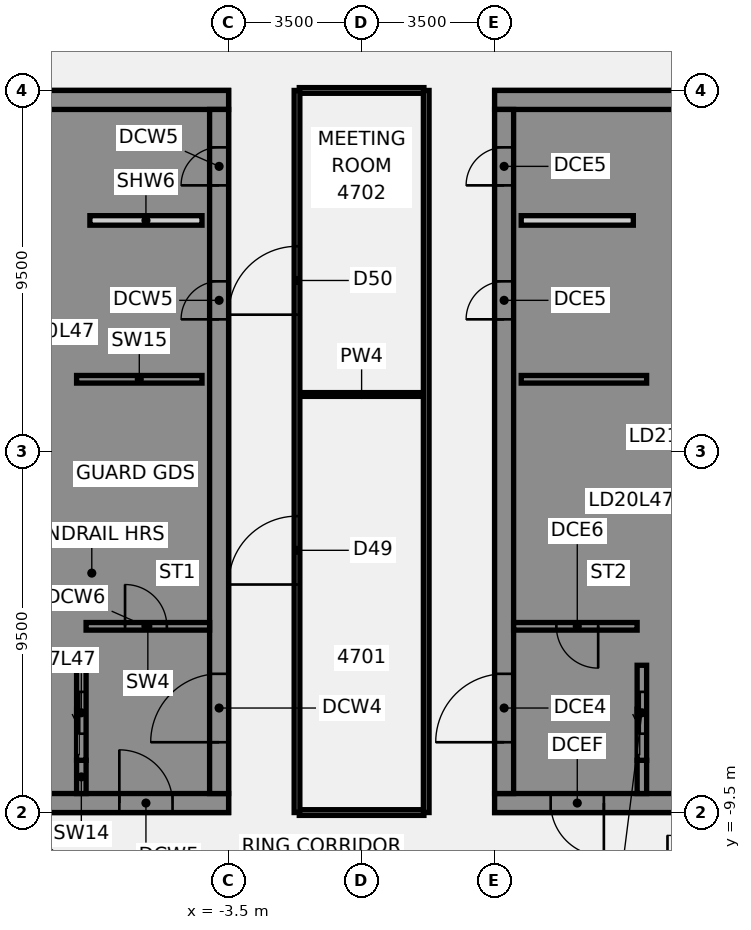
"""IFC4 building model, lengths in metres.
Left out: names, types, materials, properties, quantities, classifications, styles, units other than length and angle.
Written with IfcOpenShell. Run it as: python <this file> out.ifc"""

import sys

from ifc_helpers import new_model, si_unit, direction, frame, frame_2d, origin, place, context, subcontext, project, spatial, polyline, rectangle, outline, extrude, element, fill, save


model = new_model("IFC4")
c1 = context("Model", 3, precision=1e-05, world=origin(), true_north=direction((0.0, 1.0)))
c2 = subcontext(c1, "Body", "Model", "MODEL_VIEW")
j1 = project(units=[si_unit("LENGTHUNIT", "METRE"), si_unit("PLANEANGLEUNIT", "RADIAN")], contexts=[c1])
p1 = place(None, origin())
s1 = spatial("IfcSite", under=j1, at=p1, CompositionType="ELEMENT")
p2 = place(p1, origin())
s2 = spatial("IfcBuilding", under=s1, at=p2, CompositionType="ELEMENT")
p3 = place(p2, frame((0.0, 0.0, 189.7)))
s3 = spatial("IfcBuildingStorey", under=s2, at=p3, CompositionType="ELEMENT", Elevation=189.7)
p4 = place(p3, frame((-1.64, -9.5, 0.0), z_axis=(0.0, 0.0, 1.0), x_axis=(1.0, 0.0, 0.0)))
e1 = element("IfcWall", 1, at=p4, inside=s3, PredefinedType="PARTITIONING", context=c2, shape_type="SweptSolid", body=[
    extrude(rectangle(XDim=3.28, YDim=0.15, at=frame_2d((1.64, 0.0))), origin(), (0.0, 0.0, 1.0), 2.864),
])
p5 = place(p3, frame((-1.64, 1.5, 0.0), z_axis=(0.0, 0.0, 1.0), x_axis=(1.0, 0.0, 0.0)))
e2 = element("IfcWall", 2, at=p5, inside=s3, PredefinedType="PARTITIONING", context=c2, shape_type="SweptSolid", body=[
    extrude(rectangle(XDim=3.28, YDim=0.1, at=frame_2d((1.64, 0.0))), origin(), (0.0, 0.0, 1.0), 2.864),
])
p6 = place(p3, frame((-1.64, 9.5, 0.0), z_axis=(0.0, 0.0, 1.0), x_axis=(1.0, 0.0, 0.0)))
e3 = element("IfcWall", 3, at=p6, inside=s3, PredefinedType="PARTITIONING", context=c2, shape_type="SweptSolid", body=[
    extrude(rectangle(XDim=3.28, YDim=0.15, at=frame_2d((1.64, 0.0))), origin(), (0.0, 0.0, 1.0), 2.864),
])
p7 = place(p3, frame((-1.7, -9.5, 0.0), z_axis=(0.0, 0.0, 1.0), x_axis=(0.0, 1.0, 0.0)))
e4 = element("IfcWall", 4, at=p7, inside=s3, PredefinedType="PARTITIONING", context=c2, shape_type="SweptSolid", body=[
    extrude(rectangle(XDim=19.0, YDim=0.15, at=frame_2d((9.5, 0.0))), origin(), (0.0, 0.0, 1.0), 2.864),
])
p8 = place(p7, frame((6.0, 0.0, 0.0)))
e5 = element("IfcOpeningElement", 5, at=p8, cuts=e4, PredefinedType="OPENING", context=c2, shape_type="SweptSolid", body=[
    extrude(rectangle(XDim=1.8, YDim=2.1, at=frame_2d((0.9, 1.05))), frame((0.0, 0.085, 0.0), z_axis=(0.0, -1.0, 0.0), x_axis=(1.0, 0.0, 0.0)), (0.0, 0.0, 1.0), 0.17),
])
p9 = place(p7, frame((13.1, 0.0, 0.0)))
e6 = element("IfcOpeningElement", 6, at=p9, cuts=e4, PredefinedType="OPENING", context=c2, shape_type="SweptSolid", body=[
    extrude(rectangle(XDim=1.8, YDim=2.1, at=frame_2d((0.9, 1.05))), frame((0.0, 0.085, 0.0), z_axis=(0.0, -1.0, 0.0), x_axis=(1.0, 0.0, 0.0)), (0.0, 0.0, 1.0), 0.17),
])
p10 = place(p3, frame((1.7, -9.5, 0.0), z_axis=(0.0, 0.0, 1.0), x_axis=(0.0, 1.0, 0.0)))
e7 = element("IfcWall", 7, at=p10, inside=s3, PredefinedType="PARTITIONING", context=c2, shape_type="SweptSolid", body=[
    extrude(rectangle(XDim=19.0, YDim=0.15, at=frame_2d((9.5, 0.0))), origin(), (0.0, 0.0, 1.0), 2.864),
])
p11 = place(p3, frame((-16.5, -9.25, 0.0), z_axis=(0.0, 0.0, 1.0), x_axis=(1.0, 0.0, 0.0)))
e8 = element("IfcWall", 8, at=p11, inside=s3, PredefinedType="SHEAR", context=c2, shape_type="SweptSolid", body=[
    extrude(rectangle(XDim=13.0, YDim=0.5, at=frame_2d((6.5, 0.0))), origin(), (0.0, 0.0, 1.0), 3.46),
])
p12 = place(p11, frame((4.15, 0.0, 0.0)))
e9 = element("IfcOpeningElement", 9, at=p12, cuts=e8, PredefinedType="OPENING", context=c2, shape_type="SweptSolid", body=[
    extrude(rectangle(XDim=1.4, YDim=2.1, at=frame_2d((0.7, 1.05))), frame((0.0, 0.26, 0.0), z_axis=(0.0, -1.0, 0.0), x_axis=(1.0, 0.0, 0.0)), (0.0, 0.0, 1.0), 0.52),
])
p13 = place(p11, frame((10.125, 0.0, 0.0)))
e10 = element("IfcOpeningElement", 10, at=p13, cuts=e8, PredefinedType="OPENING", context=c2, shape_type="SweptSolid", body=[
    extrude(rectangle(XDim=1.4, YDim=2.1, at=frame_2d((0.7, 1.05))), frame((0.0, 0.26, 0.0), z_axis=(0.0, -1.0, 0.0), x_axis=(1.0, 0.0, 0.0)), (0.0, 0.0, 1.0), 0.52),
])
p14 = place(p3, frame((-16.5, 9.25, 0.0), z_axis=(0.0, 0.0, 1.0), x_axis=(1.0, 0.0, 0.0)))
e11 = element("IfcWall", 11, at=p14, inside=s3, PredefinedType="SHEAR", context=c2, shape_type="SweptSolid", body=[
    extrude(rectangle(XDim=13.0, YDim=0.5, at=frame_2d((6.5, 0.0))), origin(), (0.0, 0.0, 1.0), 3.46),
])
p15 = place(p3, origin())
e12 = element("IfcWall", 12, at=p15, inside=s3, PredefinedType="SHEAR", context=c2, shape_type="SweptSolid", body=[
    extrude(outline(polyline([(-9.8, -5.375), (-9.8, -5.625), (-7.5, -5.625), (-7.25, -5.625), (-7.25, 9.0), (-7.5, 9.0), (-9.8, 9.0), (-9.8, 8.125), (-7.5, 8.125), (-7.5, 5.625), (-9.8, 5.625), (-9.8, 5.375), (-7.5, 5.375), (-7.5, 2.875), (-9.8, 2.875), (-9.8, 2.625), (-7.5, 2.625), (-7.5, 0.125), (-9.8, 0.125), (-9.8, -0.125), (-7.5, -0.125), (-7.5, -2.625), (-9.8, -2.625), (-9.8, -2.875), (-7.5, -2.875), (-7.5, -5.375), (-9.8, -5.375)])), origin(), (0.0, 0.0, 1.0), 3.46),
])
p16 = place(p3, origin())
e13 = element("IfcWall", 13, at=p16, inside=s3, PredefinedType="SHEAR", context=c2, shape_type="SweptSolid", body=[
    extrude(outline(polyline([(-7.5, -8.125), (-9.55, -8.125), (-9.55, -5.625), (-9.8, -5.625), (-9.8, -8.125), (-9.8, -9.0), (-7.5, -9.0), (-7.5, -8.125)])), origin(), (0.0, 0.0, 1.0), 3.46),
])
p17 = place(p3, frame((-7.375, -9.0, 0.0), z_axis=(0.0, 0.0, 1.0), x_axis=(0.0, 1.0, 0.0)))
e14 = element("IfcWall", 14, at=p17, inside=s3, PredefinedType="SHEAR", context=c2, shape_type="SweptSolid", body=[
    extrude(rectangle(XDim=0.875, YDim=0.25, at=frame_2d((0.438, 0.0))), origin(), (0.0, 0.0, 1.0), 3.46),
])
p18 = place(p3, frame((-7.5, 1.9, 0.0), z_axis=(0.0, 0.0, 1.0), x_axis=(1.0, 0.0, 0.0)))
e15 = element("IfcWall", 15, at=p18, inside=s3, PredefinedType="SHEAR", context=c2, shape_type="SweptSolid", body=[
    extrude(rectangle(XDim=3.3, YDim=0.2, at=frame_2d((1.65, 0.0))), origin(), (0.0, 0.0, 1.0), 3.46),
])
p19 = place(p3, frame((-7.375, -8.125, 0.0), z_axis=(0.0, 0.0, 1.0), x_axis=(0.0, 1.0, 0.0)))
e16 = element("IfcWall", 16, at=p19, inside=s3, PredefinedType="SHEAR", context=c2, shape_type="SweptSolid", body=[
    extrude(rectangle(XDim=2.5, YDim=0.25, at=frame_2d((1.25, 0.0))), origin(), (0.0, 0.0, 1.0), 3.46),
])
p20 = place(p19, frame((0.7, 0.0, 0.0)))
e17 = element("IfcOpeningElement", 17, at=p20, cuts=e16, PredefinedType="OPENING", context=c2, shape_type="SweptSolid", body=[
    extrude(rectangle(XDim=1.1, YDim=2.1, at=frame_2d((0.55, 1.05))), frame((0.0, 0.135, 0.0), z_axis=(0.0, -1.0, 0.0), x_axis=(1.0, 0.0, 0.0)), (0.0, 0.0, 1.0), 0.27),
])
p21 = place(p3, frame((-3.75, -9.0, 0.0), z_axis=(0.0, 0.0, 1.0), x_axis=(0.0, 1.0, 0.0)))
e18 = element("IfcWall", 18, at=p21, inside=s3, PredefinedType="SHEAR", context=c2, shape_type="SweptSolid", body=[
    extrude(rectangle(XDim=18.0, YDim=0.5, at=frame_2d((9.0, 0.0))), origin(), (0.0, 0.0, 1.0), 3.46),
])
p22 = place(p21, frame((1.35, 0.0, 0.0)))
e19 = element("IfcOpeningElement", 19, at=p22, cuts=e18, PredefinedType="OPENING", context=c2, shape_type="SweptSolid", body=[
    extrude(rectangle(XDim=1.8, YDim=2.1, at=frame_2d((0.9, 1.05))), frame((0.0, 0.26, 0.0), z_axis=(0.0, -1.0, 0.0), x_axis=(1.0, 0.0, 0.0)), (0.0, 0.0, 1.0), 0.52),
])
p23 = place(p21, frame((12.478, 0.0, 0.0)))
e20 = element("IfcOpeningElement", 20, at=p23, cuts=e18, PredefinedType="OPENING", context=c2, shape_type="SweptSolid", body=[
    extrude(rectangle(XDim=1.0, YDim=2.1, at=frame_2d((0.5, 1.05))), frame((0.0, 0.26, 0.0), z_axis=(0.0, -1.0, 0.0), x_axis=(1.0, 0.0, 0.0)), (0.0, 0.0, 1.0), 0.52),
])
p24 = place(p21, frame((16.002, 0.0, 0.0)))
e21 = element("IfcOpeningElement", 21, at=p24, cuts=e18, PredefinedType="OPENING", context=c2, shape_type="SweptSolid", body=[
    extrude(rectangle(XDim=1.0, YDim=2.1, at=frame_2d((0.5, 1.05))), frame((0.0, 0.26, 0.0), z_axis=(0.0, -1.0, 0.0), x_axis=(1.0, 0.0, 0.0)), (0.0, 0.0, 1.0), 0.52),
])
p25 = place(p3, frame((-7.15, 6.08, 0.0), z_axis=(0.0, 0.0, 1.0), x_axis=(1.0, 0.0, 0.0)))
e22 = element("IfcWall", 22, at=p25, inside=s3, PredefinedType="PARTITIONING", context=c2, shape_type="SweptSolid", body=[
    extrude(rectangle(XDim=2.95, YDim=0.25, at=frame_2d((1.475, 0.0))), origin(), (0.0, 0.0, 1.0), 3.46),
])
p26 = place(p3, frame((-7.25, -4.6, 0.0), z_axis=(0.0, 0.0, 1.0), x_axis=(1.0, 0.0, 0.0)))
e23 = element("IfcWall", 23, at=p26, inside=s3, PredefinedType="SHEAR", context=c2, shape_type="SweptSolid", body=[
    extrude(rectangle(XDim=3.25, YDim=0.2, at=frame_2d((1.625, 0.0))), origin(), (0.0, 0.0, 1.0), 3.46),
])
p27 = place(p26, frame((1.025, 0.0, 0.0)))
e24 = element("IfcOpeningElement", 24, at=p27, cuts=e23, PredefinedType="OPENING", context=c2, shape_type="SweptSolid", body=[
    extrude(rectangle(XDim=1.1, YDim=2.1, at=frame_2d((0.55, 1.05))), frame((0.0, 0.11, 0.0), z_axis=(0.0, -1.0, 0.0), x_axis=(1.0, 0.0, 0.0)), (0.0, 0.0, 1.0), 0.22),
])
p28 = place(p3, frame((16.5, -9.25, 0.0), z_axis=(0.0, 0.0, 1.0), x_axis=(-1.0, 0.0, 0.0)))
e25 = element("IfcWall", 25, at=p28, inside=s3, PredefinedType="SHEAR", context=c2, shape_type="SweptSolid", body=[
    extrude(rectangle(XDim=13.0, YDim=0.5, at=frame_2d((6.5, 0.0))), origin(), (0.0, 0.0, 1.0), 3.46),
])
p29 = place(p28, frame((4.15, 0.0, 0.0)))
e26 = element("IfcOpeningElement", 26, at=p29, cuts=e25, PredefinedType="OPENING", context=c2, shape_type="SweptSolid", body=[
    extrude(rectangle(XDim=1.4, YDim=2.1, at=frame_2d((0.7, 1.05))), frame((0.0, 0.26, 0.0), z_axis=(0.0, -1.0, 0.0), x_axis=(1.0, 0.0, 0.0)), (0.0, 0.0, 1.0), 0.52),
])
p30 = place(p28, frame((10.125, 0.0, 0.0)))
e27 = element("IfcOpeningElement", 27, at=p30, cuts=e25, PredefinedType="OPENING", context=c2, shape_type="SweptSolid", body=[
    extrude(rectangle(XDim=1.4, YDim=2.1, at=frame_2d((0.7, 1.05))), frame((0.0, 0.26, 0.0), z_axis=(0.0, -1.0, 0.0), x_axis=(1.0, 0.0, 0.0)), (0.0, 0.0, 1.0), 0.52),
])
p31 = place(p3, frame((16.5, 9.25, 0.0), z_axis=(0.0, 0.0, 1.0), x_axis=(-1.0, 0.0, 0.0)))
e28 = element("IfcWall", 28, at=p31, inside=s3, PredefinedType="SHEAR", context=c2, shape_type="SweptSolid", body=[
    extrude(rectangle(XDim=13.0, YDim=0.5, at=frame_2d((6.5, 0.0))), origin(), (0.0, 0.0, 1.0), 3.46),
])
p32 = place(p3, origin())
e29 = element("IfcWall", 29, at=p32, inside=s3, PredefinedType="SHEAR", context=c2, shape_type="SweptSolid", body=[
    extrude(outline(polyline([(9.8, -5.375), (7.5, -5.375), (7.5, -2.875), (9.8, -2.875), (9.8, -2.625), (7.5, -2.625), (7.5, -0.125), (9.8, -0.125), (9.8, 0.125), (7.5, 0.125), (7.5, 2.625), (9.8, 2.625), (9.8, 2.875), (7.5, 2.875), (7.5, 5.375), (9.8, 5.375), (9.8, 5.625), (7.5, 5.625), (7.5, 8.125), (9.8, 8.125), (9.8, 9.0), (7.5, 9.0), (7.25, 9.0), (7.25, -5.625), (7.5, -5.625), (9.8, -5.625), (9.8, -5.375)])), origin(), (0.0, 0.0, 1.0), 3.46),
])
p33 = place(p3, origin())
e30 = element("IfcWall", 30, at=p33, inside=s3, PredefinedType="SHEAR", context=c2, shape_type="SweptSolid", body=[
    extrude(outline(polyline([(7.5, -8.125), (7.5, -9.0), (9.8, -9.0), (9.8, -8.125), (9.8, -5.625), (9.55, -5.625), (9.55, -8.125), (7.5, -8.125)])), origin(), (0.0, 0.0, 1.0), 3.46),
])
p34 = place(p3, frame((7.375, -9.0, 0.0), z_axis=(0.0, 0.0, 1.0), x_axis=(0.0, 1.0, 0.0)))
e31 = element("IfcWall", 31, at=p34, inside=s3, PredefinedType="SHEAR", context=c2, shape_type="SweptSolid", body=[
    extrude(rectangle(XDim=0.875, YDim=0.25, at=frame_2d((0.438, 0.0))), origin(), (0.0, 0.0, 1.0), 3.46),
])
p35 = place(p3, frame((7.5, 1.9, 0.0), z_axis=(0.0, 0.0, 1.0), x_axis=(-1.0, 0.0, 0.0)))
e32 = element("IfcWall", 32, at=p35, inside=s3, PredefinedType="SHEAR", context=c2, shape_type="SweptSolid", body=[
    extrude(rectangle(XDim=3.3, YDim=0.2, at=frame_2d((1.65, 0.0))), origin(), (0.0, 0.0, 1.0), 3.46),
])
p36 = place(p3, frame((7.375, -8.125, 0.0), z_axis=(0.0, 0.0, 1.0), x_axis=(0.0, 1.0, 0.0)))
e33 = element("IfcWall", 33, at=p36, inside=s3, PredefinedType="SHEAR", context=c2, shape_type="SweptSolid", body=[
    extrude(rectangle(XDim=2.5, YDim=0.25, at=frame_2d((1.25, 0.0))), origin(), (0.0, 0.0, 1.0), 3.46),
])
p37 = place(p36, frame((0.7, 0.0, 0.0)))
e34 = element("IfcOpeningElement", 34, at=p37, cuts=e33, PredefinedType="OPENING", context=c2, shape_type="SweptSolid", body=[
    extrude(rectangle(XDim=1.1, YDim=2.1, at=frame_2d((0.55, 1.05))), frame((0.0, 0.135, 0.0), z_axis=(0.0, -1.0, 0.0), x_axis=(1.0, 0.0, 0.0)), (0.0, 0.0, 1.0), 0.27),
])
p38 = place(p3, frame((3.75, -9.0, 0.0), z_axis=(0.0, 0.0, 1.0), x_axis=(0.0, 1.0, 0.0)))
e35 = element("IfcWall", 35, at=p38, inside=s3, PredefinedType="SHEAR", context=c2, shape_type="SweptSolid", body=[
    extrude(rectangle(XDim=18.0, YDim=0.5, at=frame_2d((9.0, 0.0))), origin(), (0.0, 0.0, 1.0), 3.46),
])
p39 = place(p38, frame((1.35, 0.0, 0.0)))
e36 = element("IfcOpeningElement", 36, at=p39, cuts=e35, PredefinedType="OPENING", context=c2, shape_type="SweptSolid", body=[
    extrude(rectangle(XDim=1.8, YDim=2.1, at=frame_2d((0.9, 1.05))), frame((0.0, 0.26, 0.0), z_axis=(0.0, -1.0, 0.0), x_axis=(1.0, 0.0, 0.0)), (0.0, 0.0, 1.0), 0.52),
])
p40 = place(p38, frame((12.478, 0.0, 0.0)))
e37 = element("IfcOpeningElement", 37, at=p40, cuts=e35, PredefinedType="OPENING", context=c2, shape_type="SweptSolid", body=[
    extrude(rectangle(XDim=1.0, YDim=2.1, at=frame_2d((0.5, 1.05))), frame((0.0, 0.26, 0.0), z_axis=(0.0, -1.0, 0.0), x_axis=(1.0, 0.0, 0.0)), (0.0, 0.0, 1.0), 0.52),
])
p41 = place(p38, frame((16.002, 0.0, 0.0)))
e38 = element("IfcOpeningElement", 38, at=p41, cuts=e35, PredefinedType="OPENING", context=c2, shape_type="SweptSolid", body=[
    extrude(rectangle(XDim=1.0, YDim=2.1, at=frame_2d((0.5, 1.05))), frame((0.0, 0.26, 0.0), z_axis=(0.0, -1.0, 0.0), x_axis=(1.0, 0.0, 0.0)), (0.0, 0.0, 1.0), 0.52),
])
p42 = place(p3, frame((7.15, 6.08, 0.0), z_axis=(0.0, 0.0, 1.0), x_axis=(-1.0, 0.0, 0.0)))
e39 = element("IfcWall", 39, at=p42, inside=s3, PredefinedType="PARTITIONING", context=c2, shape_type="SweptSolid", body=[
    extrude(rectangle(XDim=2.95, YDim=0.25, at=frame_2d((1.475, 0.0))), origin(), (0.0, 0.0, 1.0), 3.46),
])
p43 = place(p3, frame((7.25, -4.6, 0.0), z_axis=(0.0, 0.0, 1.0), x_axis=(-1.0, 0.0, 0.0)))
e40 = element("IfcWall", 40, at=p43, inside=s3, PredefinedType="SHEAR", context=c2, shape_type="SweptSolid", body=[
    extrude(rectangle(XDim=3.25, YDim=0.2, at=frame_2d((1.625, 0.0))), origin(), (0.0, 0.0, 1.0), 3.46),
])
p44 = place(p43, frame((1.025, 0.0, 0.0)))
e41 = element("IfcOpeningElement", 41, at=p44, cuts=e40, PredefinedType="OPENING", context=c2, shape_type="SweptSolid", body=[
    extrude(rectangle(XDim=1.1, YDim=2.1, at=frame_2d((0.55, 1.05))), frame((0.0, 0.11, 0.0), z_axis=(0.0, -1.0, 0.0), x_axis=(1.0, 0.0, 0.0)), (0.0, 0.0, 1.0), 0.22),
])
p45 = place(p8, frame((1.8, 0.0, 0.0), z_axis=(0.0, 0.0, 1.0), x_axis=(-1.0, 0.0, 0.0)))
e42 = element("IfcDoor", 42, at=p45, inside=s3, OperationType="DOUBLE_DOOR_SINGLE_SWING", PredefinedType="DOOR", context=c2, shape_type="SweptSolid", body=[
    extrude(rectangle(XDim=1.8, YDim=2.1, at=frame_2d((0.9, 1.05))), frame((0.0, 0.025, 0.0), z_axis=(0.0, -1.0, 0.0), x_axis=(1.0, 0.0, 0.0)), (0.0, 0.0, 1.0), 0.05),
])
fill(e5, e42)
p46 = place(p9, frame((1.8, 0.0, 0.0), z_axis=(0.0, 0.0, 1.0), x_axis=(-1.0, 0.0, 0.0)))
e43 = element("IfcDoor", 43, at=p46, inside=s3, OperationType="DOUBLE_DOOR_SINGLE_SWING", PredefinedType="DOOR", context=c2, shape_type="SweptSolid", body=[
    extrude(rectangle(XDim=1.8, YDim=2.1, at=frame_2d((0.9, 1.05))), frame((0.0, 0.025, 0.0), z_axis=(0.0, -1.0, 0.0), x_axis=(1.0, 0.0, 0.0)), (0.0, 0.0, 1.0), 0.05),
])
fill(e6, e43)
p47 = place(p13, origin())
e44 = element("IfcDoor", 44, at=p47, inside=s3, OperationType="SINGLE_SWING_LEFT", PredefinedType="DOOR", context=c2, shape_type="SweptSolid", body=[
    extrude(rectangle(XDim=1.4, YDim=2.1, at=frame_2d((0.7, 1.05))), frame((0.0, 0.025, 0.0), z_axis=(0.0, -1.0, 0.0), x_axis=(1.0, 0.0, 0.0)), (0.0, 0.0, 1.0), 0.05),
])
fill(e10, e44)
p48 = place(p22, origin())
e45 = element("IfcDoor", 45, at=p48, inside=s3, OperationType="SINGLE_SWING_LEFT", PredefinedType="DOOR", context=c2, shape_type="SweptSolid", body=[
    extrude(rectangle(XDim=1.8, YDim=2.1, at=frame_2d((0.9, 1.05))), frame((0.0, 0.025, 0.0), z_axis=(0.0, -1.0, 0.0), x_axis=(1.0, 0.0, 0.0)), (0.0, 0.0, 1.0), 0.05),
])
fill(e19, e45)
p49 = place(p23, origin())
e46 = element("IfcDoor", 46, at=p49, inside=s3, OperationType="SINGLE_SWING_LEFT", PredefinedType="DOOR", context=c2, shape_type="SweptSolid", body=[
    extrude(rectangle(XDim=1.0, YDim=2.1, at=frame_2d((0.5, 1.05))), frame((0.0, 0.225, 0.0), z_axis=(0.0, -1.0, 0.0), x_axis=(1.0, 0.0, 0.0)), (0.0, 0.0, 1.0), 0.05),
])
fill(e20, e46)
p50 = place(p24, origin())
e47 = element("IfcDoor", 47, at=p50, inside=s3, OperationType="SINGLE_SWING_LEFT", PredefinedType="DOOR", context=c2, shape_type="SweptSolid", body=[
    extrude(rectangle(XDim=1.0, YDim=2.1, at=frame_2d((0.5, 1.05))), frame((0.0, 0.225, 0.0), z_axis=(0.0, -1.0, 0.0), x_axis=(1.0, 0.0, 0.0)), (0.0, 0.0, 1.0), 0.05),
])
fill(e21, e47)
p51 = place(p27, origin())
e48 = element("IfcDoor", 48, at=p51, inside=s3, OperationType="SINGLE_SWING_LEFT", PredefinedType="DOOR", context=c2, shape_type="SweptSolid", body=[
    extrude(rectangle(XDim=1.1, YDim=2.1, at=frame_2d((0.55, 1.05))), frame((0.0, 0.025, 0.0), z_axis=(0.0, -1.0, 0.0), x_axis=(1.0, 0.0, 0.0)), (0.0, 0.0, 1.0), 0.05),
])
fill(e24, e48)
p52 = place(p20, origin())
e49 = element("IfcDoor", 49, at=p52, inside=s3, OperationType="SLIDING_TO_LEFT", PredefinedType="DOOR", context=c2, shape_type="SweptSolid", body=[
    extrude(rectangle(XDim=1.1, YDim=2.1, at=frame_2d((0.55, 1.05))), frame((0.0, 0.025, 0.0), z_axis=(0.0, -1.0, 0.0), x_axis=(1.0, 0.0, 0.0)), (0.0, 0.0, 1.0), 0.05),
])
fill(e17, e49)
p53 = place(p30, origin())
e50 = element("IfcDoor", 50, at=p53, inside=s3, OperationType="SINGLE_SWING_LEFT", PredefinedType="DOOR", context=c2, shape_type="SweptSolid", body=[
    extrude(rectangle(XDim=1.4, YDim=2.1, at=frame_2d((0.7, 1.05))), frame((0.0, 0.025, 0.0), z_axis=(0.0, -1.0, 0.0), x_axis=(1.0, 0.0, 0.0)), (0.0, 0.0, 1.0), 0.05),
])
fill(e27, e50)
p54 = place(p39, origin())
e51 = element("IfcDoor", 51, at=p54, inside=s3, OperationType="SINGLE_SWING_LEFT", PredefinedType="DOOR", context=c2, shape_type="SweptSolid", body=[
    extrude(rectangle(XDim=1.8, YDim=2.1, at=frame_2d((0.9, 1.05))), frame((0.0, 0.025, 0.0), z_axis=(0.0, -1.0, 0.0), x_axis=(1.0, 0.0, 0.0)), (0.0, 0.0, 1.0), 0.05),
])
fill(e36, e51)
p55 = place(p40, origin())
e52 = element("IfcDoor", 52, at=p55, inside=s3, OperationType="SINGLE_SWING_LEFT", PredefinedType="DOOR", context=c2, shape_type="SweptSolid", body=[
    extrude(rectangle(XDim=1.0, YDim=2.1, at=frame_2d((0.5, 1.05))), frame((0.0, -0.175, 0.0), z_axis=(0.0, -1.0, 0.0), x_axis=(1.0, 0.0, 0.0)), (0.0, 0.0, 1.0), 0.05),
])
fill(e37, e52)
p56 = place(p41, origin())
e53 = element("IfcDoor", 53, at=p56, inside=s3, OperationType="SINGLE_SWING_LEFT", PredefinedType="DOOR", context=c2, shape_type="SweptSolid", body=[
    extrude(rectangle(XDim=1.0, YDim=2.1, at=frame_2d((0.5, 1.05))), frame((0.0, -0.175, 0.0), z_axis=(0.0, -1.0, 0.0), x_axis=(1.0, 0.0, 0.0)), (0.0, 0.0, 1.0), 0.05),
])
fill(e38, e53)
p57 = place(p44, origin())
e54 = element("IfcDoor", 54, at=p57, inside=s3, OperationType="SINGLE_SWING_LEFT", PredefinedType="DOOR", context=c2, shape_type="SweptSolid", body=[
    extrude(rectangle(XDim=1.1, YDim=2.1, at=frame_2d((0.55, 1.05))), frame((0.0, 0.025, 0.0), z_axis=(0.0, -1.0, 0.0), x_axis=(1.0, 0.0, 0.0)), (0.0, 0.0, 1.0), 0.05),
])
fill(e41, e54)
p58 = place(p37, origin())
e55 = element("IfcDoor", 55, at=p58, inside=s3, OperationType="SLIDING_TO_LEFT", PredefinedType="DOOR", context=c2, shape_type="SweptSolid", body=[
    extrude(rectangle(XDim=1.1, YDim=2.1, at=frame_2d((0.55, 1.05))), frame((0.0, 0.025, 0.0), z_axis=(0.0, -1.0, 0.0), x_axis=(1.0, 0.0, 0.0)), (0.0, 0.0, 1.0), 0.05),
])
fill(e34, e55)
save(model, sys.argv[1])
